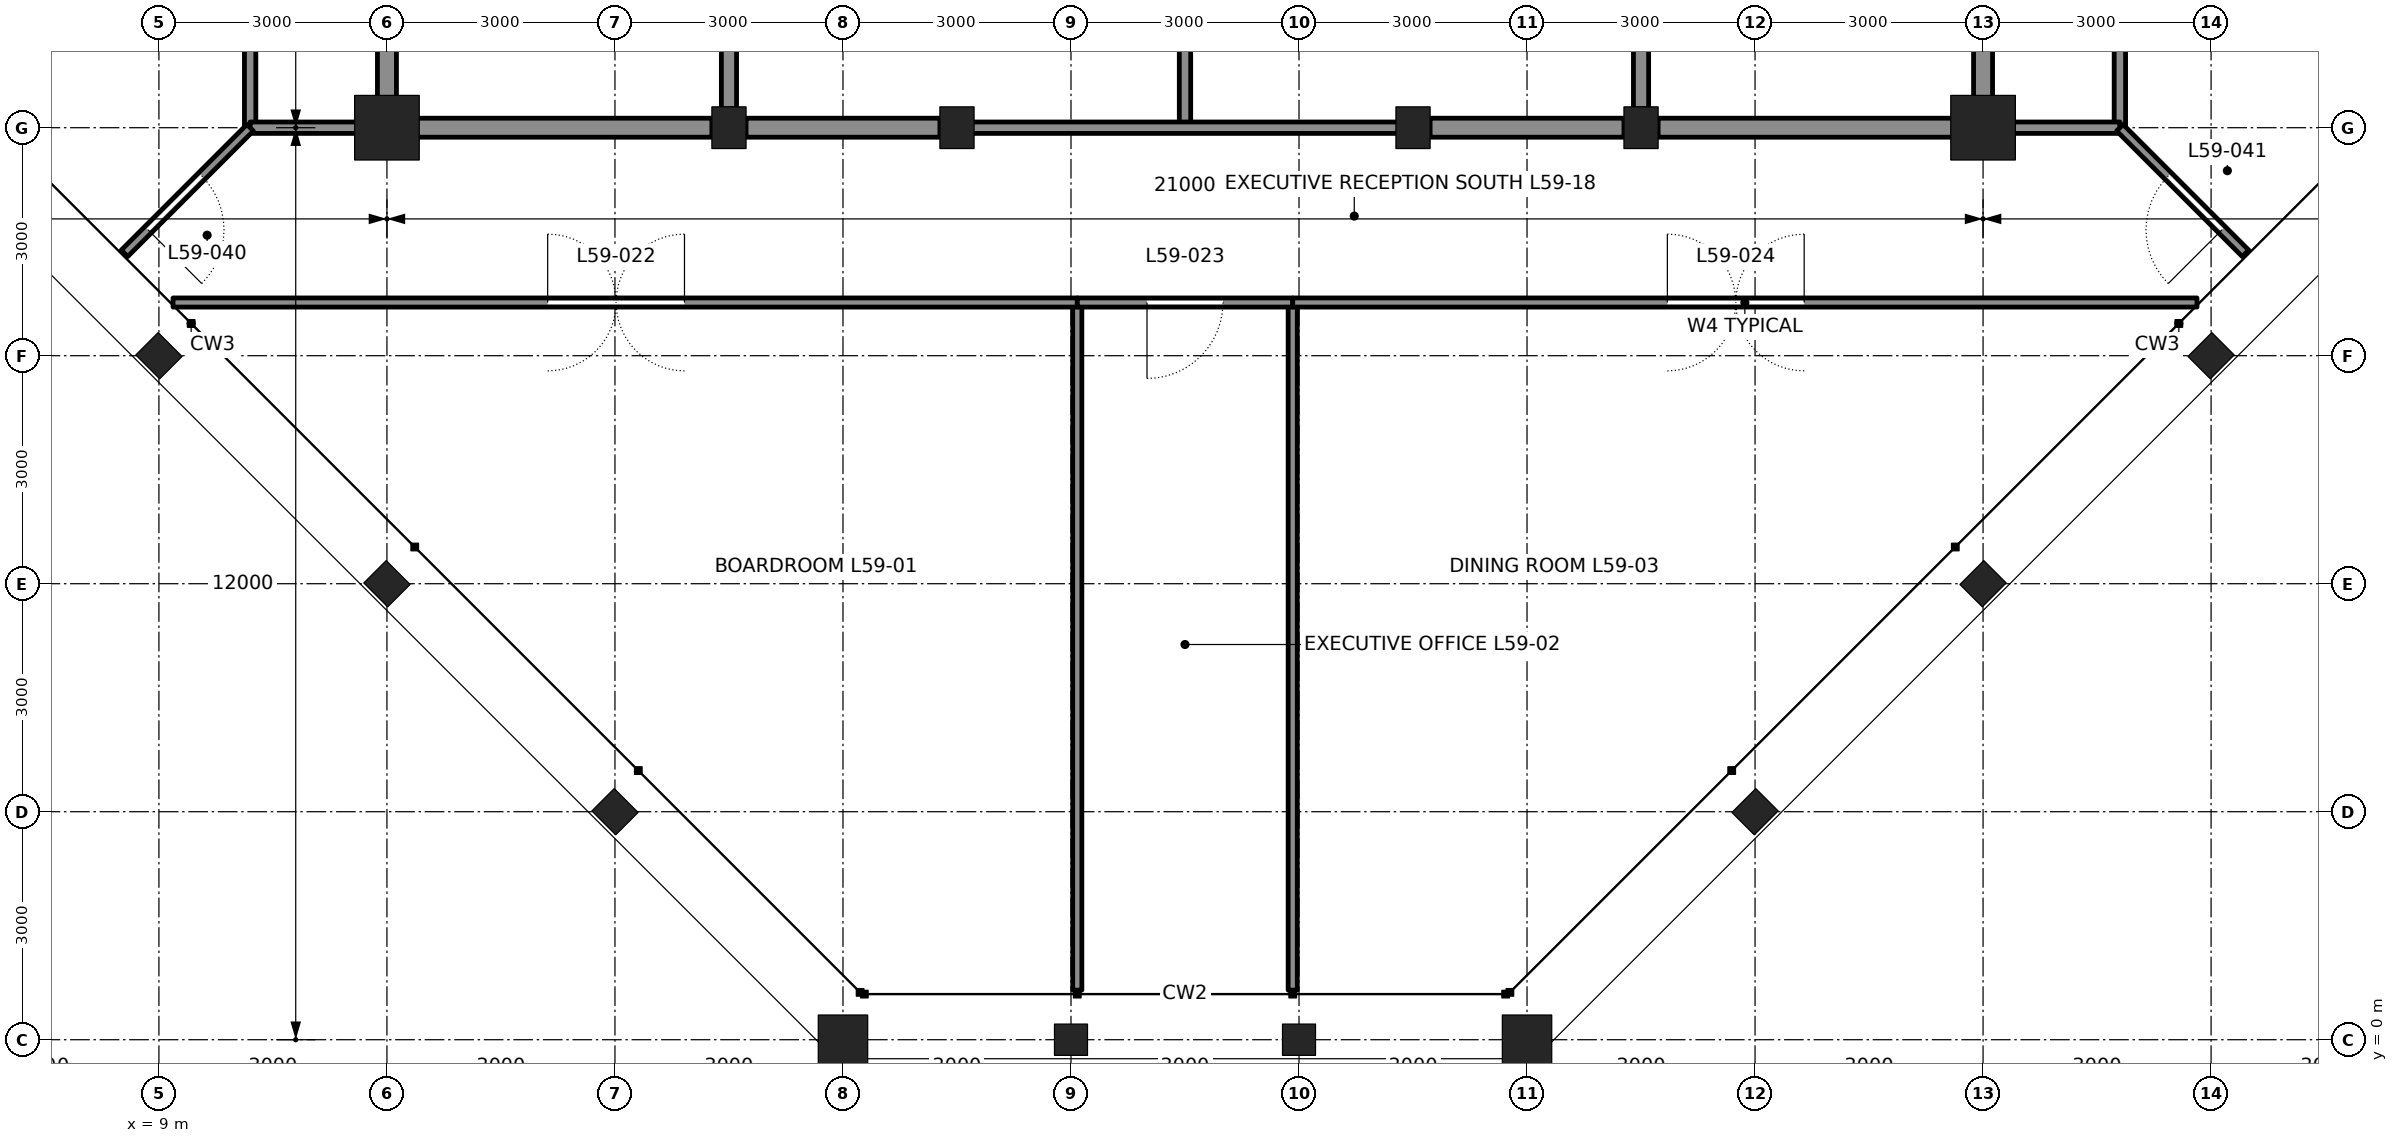
"""IFC4 building model, lengths in metres.
Left out: names, types, materials, properties, quantities, classifications, styles, units other than length and angle.
Written with IfcOpenShell. Run it as: python <this file> out.ifc"""

import sys

from ifc_helpers import new_model, si_unit, direction, frame, frame_2d, origin, origin_2d, place, context, subcontext, project, spatial, rectangle, hollow_rectangle, i_section, extrude, element, fill, save


model = new_model("IFC4")
c1 = context("Model", 3, precision=1e-05, world=origin(), true_north=direction((0.0, 1.0)))
c2 = subcontext(c1, "Body", "Model", "MODEL_VIEW")
j1 = project(units=[si_unit("LENGTHUNIT", "METRE"), si_unit("PLANEANGLEUNIT", "RADIAN")], contexts=[c1])
p1 = place(None, origin())
s1 = spatial("IfcSite", under=j1, at=p1, CompositionType="ELEMENT")
p2 = place(p1, origin())
s2 = spatial("IfcBuilding", under=s1, at=p2, CompositionType="ELEMENT")
p3 = place(p2, frame((0.0, 0.0, 266.4)))
s3 = spatial("IfcBuildingStorey", under=s2, at=p3, CompositionType="ELEMENT", Elevation=266.4)
p4 = place(p3, frame((18.0, 0.0, 0.0), z_axis=(0.0, 0.0, 1.0), x_axis=(0.0, -1.0, 0.0)))
e1 = element("IfcColumn", 1, at=p4, inside=s3, PredefinedType="COLUMN", context=c2, shape_type="SweptSolid", body=[
    extrude(hollow_rectangle(XDim=0.65, YDim=0.65, WallThickness=0.065, at=origin_2d()), origin(), (0.0, 0.0, 1.0), 4.2),
])
for number, where, z_axis, x_axis in (
    (2, (21.0, 0.0, 0.0), (0.0, 0.0, 1.0), (0.0, -1.0, 0.0)),
    (3, (24.0, 0.0, 0.0), (0.0, 0.0, 1.0), (0.0, -1.0, 0.0)),
):
    element("IfcColumn", number, at=place(p3, frame(where, z_axis=z_axis, x_axis=x_axis)), inside=s3, PredefinedType="COLUMN", context=c2, shape_type="SweptSolid", body=[
        extrude(i_section(OverallWidth=0.411, OverallDepth=0.434, WebThickness=0.036, FlangeThickness=0.057, at=origin_2d()), origin(), (0.0, 0.0, 1.0), 4.2),
    ])
p5 = place(p3, frame((27.0, 0.0, 0.0), z_axis=(0.0, 0.0, 1.0), x_axis=(0.0, -1.0, 0.0)))
e4 = element("IfcColumn", 4, at=p5, inside=s3, PredefinedType="COLUMN", context=c2, shape_type="SweptSolid", body=[
    extrude(hollow_rectangle(XDim=0.65, YDim=0.65, WallThickness=0.065, at=origin_2d()), origin(), (0.0, 0.0, 1.0), 4.2),
])
for number, where, z_axis, x_axis in (
    (5, (30.0, 3.0, 0.0), (0.0, 0.0, 1.0), (0.707, -0.707, 0.0)),
    (6, (33.0, 6.0, 0.0), (0.0, 0.0, 1.0), (0.707, -0.707, 0.0)),
    (7, (36.0, 9.0, 0.0), (0.0, 0.0, 1.0), (0.707, -0.707, 0.0)),
    (8, (9.0, 9.0, 0.0), (0.0, 0.0, 1.0), (-0.707, -0.707, 0.0)),
    (9, (12.0, 6.0, 0.0), (0.0, 0.0, 1.0), (-0.707, -0.707, 0.0)),
    (10, (15.0, 3.0, 0.0), (0.0, 0.0, 1.0), (-0.707, -0.707, 0.0)),
):
    element("IfcColumn", number, at=place(p3, frame(where, z_axis=z_axis, x_axis=x_axis)), inside=s3, PredefinedType="COLUMN", context=c2, shape_type="SweptSolid", body=[
        extrude(i_section(OverallWidth=0.417, OverallDepth=0.445, WebThickness=0.039, FlangeThickness=0.063, at=origin_2d()), origin(), (0.0, 0.0, 1.0), 4.2),
    ])
p6 = place(p3, frame((12.0, 12.0, 0.0), z_axis=(0.0, 0.0, 1.0), x_axis=(1.0, 0.0, 0.0)))
e11 = element("IfcColumn", 11, at=p6, inside=s3, PredefinedType="COLUMN", context=c2, shape_type="SweptSolid", body=[
    extrude(hollow_rectangle(XDim=0.85, YDim=0.85, WallThickness=0.085, at=origin_2d()), origin(), (0.0, 0.0, 1.0), 4.2),
])
for number, where, z_axis, x_axis in (
    (12, (16.5, 12.0, 0.0), (0.0, 0.0, 1.0), (1.0, 0.0, 0.0)),
    (13, (19.5, 12.0, 0.0), (0.0, 0.0, 1.0), (1.0, 0.0, 0.0)),
    (14, (25.5, 12.0, 0.0), (0.0, 0.0, 1.0), (1.0, 0.0, 0.0)),
    (15, (28.5, 12.0, 0.0), (0.0, 0.0, 1.0), (1.0, 0.0, 0.0)),
):
    element("IfcColumn", number, at=place(p3, frame(where, z_axis=z_axis, x_axis=x_axis)), inside=s3, PredefinedType="COLUMN", context=c2, shape_type="SweptSolid", body=[
        extrude(i_section(OverallWidth=0.449, OverallDepth=0.549, WebThickness=0.072, FlangeThickness=0.115, at=origin_2d()), origin(), (0.0, 0.0, 1.0), 4.2),
    ])
p7 = place(p3, frame((33.0, 12.0, 0.0), z_axis=(0.0, 0.0, 1.0), x_axis=(1.0, 0.0, 0.0)))
e16 = element("IfcColumn", 16, at=p7, inside=s3, PredefinedType="COLUMN", context=c2, shape_type="SweptSolid", body=[
    extrude(hollow_rectangle(XDim=0.85, YDim=0.85, WallThickness=0.085, at=origin_2d()), origin(), (0.0, 0.0, 1.0), 4.2),
])
p8 = place(p3, frame((12.0, 12.25, 0.0), z_axis=(0.0, 0.0, 1.0), x_axis=(0.0, 1.0, 0.0)))
e17 = element("IfcWall", 17, at=p8, inside=s3, PredefinedType="SOLIDWALL", context=c2, shape_type="SweptSolid", body=[
    extrude(rectangle(XDim=8.5, YDim=0.25, at=frame_2d((4.25, 0.0))), origin(), (0.0, 0.0, 1.0), 3.113),
])
p9 = place(p8, frame((0.875, 0.0, 0.0)))
e18 = element("IfcOpeningElement", 18, at=p9, cuts=e17, PredefinedType="OPENING", context=c2, shape_type="SweptSolid", body=[
    extrude(rectangle(XDim=0.75, YDim=2.1, at=frame_2d((0.375, 1.05))), frame((0.0, 0.135, 0.0), z_axis=(0.0, -1.0, 0.0), x_axis=(1.0, 0.0, 0.0)), (0.0, 0.0, 1.0), 0.27),
])
p10 = place(p3, frame((12.25, 12.0, 0.0), z_axis=(0.0, 0.0, 1.0), x_axis=(1.0, 0.0, 0.0)))
e19 = element("IfcWall", 19, at=p10, inside=s3, PredefinedType="SOLIDWALL", context=c2, shape_type="SweptSolid", body=[
    extrude(rectangle(XDim=4.025, YDim=0.25, at=frame_2d((2.013, 0.0))), origin(), (0.0, 0.0, 1.0), 3.182),
])
for number, where, z_axis, x_axis in (
    (20, (16.725, 12.0, 0.0), (0.0, 0.0, 1.0), (1.0, 0.0, 0.0)),
    (21, (25.725, 12.0, 0.0), (0.0, 0.0, 1.0), (1.0, 0.0, 0.0)),
):
    element("IfcWall", number, at=place(p3, frame(where, z_axis=z_axis, x_axis=x_axis)), inside=s3, PredefinedType="SOLIDWALL", context=c2, shape_type="SweptSolid", body=[
        extrude(rectangle(XDim=2.55, YDim=0.25, at=frame_2d((1.275, 0.0))), origin(), (0.0, 0.0, 1.0), 3.182),
    ])
p11 = place(p3, frame((28.725, 12.0, 0.0), z_axis=(0.0, 0.0, 1.0), x_axis=(1.0, 0.0, 0.0)))
e22 = element("IfcWall", 22, at=p11, inside=s3, PredefinedType="SOLIDWALL", context=c2, shape_type="SweptSolid", body=[
    extrude(rectangle(XDim=4.025, YDim=0.25, at=frame_2d((2.013, 0.0))), origin(), (0.0, 0.0, 1.0), 3.182),
])
for number, where, z_axis, x_axis in (
    (23, (16.5, 12.25, 0.0), (0.0, 0.0, 1.0), (0.0, 1.0, 0.0)),
    (24, (28.5, 12.25, 0.0), (0.0, 0.0, 1.0), (0.0, 1.0, 0.0)),
):
    element("IfcWall", number, at=place(p3, frame(where, z_axis=z_axis, x_axis=x_axis)), inside=s3, PredefinedType="SOLIDWALL", context=c2, shape_type="SweptSolid", body=[
        extrude(rectangle(XDim=8.5, YDim=0.2, at=frame_2d((4.25, 0.0))), origin(), (0.0, 0.0, 1.0), 3.113),
    ])
p12 = place(p3, frame((33.0, 12.25, 0.0), z_axis=(0.0, 0.0, 1.0), x_axis=(0.0, 1.0, 0.0)))
e25 = element("IfcWall", 25, at=p12, inside=s3, PredefinedType="SOLIDWALL", context=c2, shape_type="SweptSolid", body=[
    extrude(rectangle(XDim=8.5, YDim=0.25, at=frame_2d((4.25, 0.0))), origin(), (0.0, 0.0, 1.0), 3.113),
])
p13 = place(p12, frame((6.65, 0.0, 0.0)))
e26 = element("IfcOpeningElement", 26, at=p13, cuts=e25, PredefinedType="OPENING", context=c2, shape_type="SweptSolid", body=[
    extrude(rectangle(XDim=1.2, YDim=2.1, at=frame_2d((0.6, 1.05))), frame((0.0, 0.135, 0.0), z_axis=(0.0, -1.0, 0.0), x_axis=(1.0, 0.0, 0.0)), (0.0, 0.0, 1.0), 0.27),
])
p14 = place(p12, frame((0.875, 0.0, 0.0)))
e27 = element("IfcOpeningElement", 27, at=p14, cuts=e25, PredefinedType="OPENING", context=c2, shape_type="SweptSolid", body=[
    extrude(rectangle(XDim=0.75, YDim=2.1, at=frame_2d((0.375, 1.05))), frame((0.0, 0.135, 0.0), z_axis=(0.0, -1.0, 0.0), x_axis=(1.0, 0.0, 0.0)), (0.0, 0.0, 1.0), 0.27),
])
p15 = place(p3, frame((22.5, 15.0, 0.0), z_axis=(0.0, 0.0, 1.0), x_axis=(0.0, -1.0, 0.0)))
e28 = element("IfcWall", 28, at=p15, inside=s3, PredefinedType="PARTITIONING", context=c2, shape_type="SweptSolid", body=[
    extrude(rectangle(XDim=3.0, YDim=0.15, at=frame_2d((1.5, 0.0))), origin(), (0.0, 0.0, 1.0), 4.04),
])
p16 = place(p3, frame((19.5, 12.0, 0.0), z_axis=(0.0, 0.0, 1.0), x_axis=(1.0, 0.0, 0.0)))
e29 = element("IfcWall", 29, at=p16, inside=s3, PredefinedType="PARTITIONING", context=c2, shape_type="SweptSolid", body=[
    extrude(rectangle(XDim=6.0, YDim=0.15, at=frame_2d((3.0, 0.0))), origin(), (0.0, 0.0, 1.0), 3.182),
])
for number, where, z_axis, x_axis in (
    (30, (21.083, 0.653, 0.0), (0.0, 0.0, 1.0), (0.0, 1.0, 0.0)),
    (31, (23.917, 0.653, 0.0), (0.0, 0.0, 1.0), (0.0, 1.0, 0.0)),
):
    element("IfcWall", number, at=place(p3, frame(where, z_axis=z_axis, x_axis=x_axis)), inside=s3, PredefinedType="PARTITIONING", context=c2, shape_type="SweptSolid", body=[
        extrude(rectangle(XDim=9.047, YDim=0.12, at=frame_2d((4.524, 0.0))), origin(), (0.0, 0.0, 1.0), 3.357),
    ])
p17 = place(p3, frame((9.186, 9.7, 0.0), z_axis=(0.0, 0.0, 1.0), x_axis=(1.0, 0.0, 0.0)))
e32 = element("IfcWall", 32, at=p17, inside=s3, PredefinedType="PARTITIONING", context=c2, shape_type="SweptSolid", body=[
    extrude(rectangle(XDim=11.897, YDim=0.12, at=frame_2d((5.949, 0.0))), origin(), (0.0, 0.0, 1.0), 4.04),
])
p18 = place(p17, frame((4.929, 0.0, 0.0)))
e33 = element("IfcOpeningElement", 33, at=p18, cuts=e32, PredefinedType="OPENING", context=c2, shape_type="SweptSolid", body=[
    extrude(rectangle(XDim=1.8, YDim=2.4, at=frame_2d((0.9, 1.2))), frame((0.0, 0.07, 0.0), z_axis=(0.0, -1.0, 0.0), x_axis=(1.0, 0.0, 0.0)), (0.0, 0.0, 1.0), 0.14),
])
p19 = place(p3, frame((21.083, 9.7, 0.0), z_axis=(0.0, 0.0, 1.0), x_axis=(1.0, 0.0, 0.0)))
e34 = element("IfcWall", 34, at=p19, inside=s3, PredefinedType="PARTITIONING", context=c2, shape_type="SweptSolid", body=[
    extrude(rectangle(XDim=2.834, YDim=0.12, at=frame_2d((1.417, 0.0))), origin(), (0.0, 0.0, 1.0), 4.04),
])
p20 = place(p19, frame((0.917, 0.0, 0.0)))
e35 = element("IfcOpeningElement", 35, at=p20, cuts=e34, PredefinedType="OPENING", context=c2, shape_type="SweptSolid", body=[
    extrude(rectangle(XDim=1.0, YDim=2.4, at=frame_2d((0.5, 1.2))), frame((0.0, 0.07, 0.0), z_axis=(0.0, -1.0, 0.0), x_axis=(1.0, 0.0, 0.0)), (0.0, 0.0, 1.0), 0.14),
])
p21 = place(p3, frame((23.917, 9.7, 0.0), z_axis=(0.0, 0.0, 1.0), x_axis=(1.0, 0.0, 0.0)))
e36 = element("IfcWall", 36, at=p21, inside=s3, PredefinedType="PARTITIONING", context=c2, shape_type="SweptSolid", body=[
    extrude(rectangle(XDim=11.897, YDim=0.12, at=frame_2d((5.949, 0.0))), origin(), (0.0, 0.0, 1.0), 4.04),
])
p22 = place(p21, frame((4.929, 0.0, 0.0)))
e37 = element("IfcOpeningElement", 37, at=p22, cuts=e36, PredefinedType="OPENING", context=c2, shape_type="SweptSolid", body=[
    extrude(rectangle(XDim=1.8, YDim=2.4, at=frame_2d((0.9, 1.2))), frame((0.0, 0.07, 0.0), z_axis=(0.0, -1.0, 0.0), x_axis=(1.0, 0.0, 0.0)), (0.0, 0.0, 1.0), 0.14),
])
p23 = place(p3, frame((10.2, 12.0, 0.0), z_axis=(0.0, 0.0, 1.0), x_axis=(0.0, 1.0, 0.0)))
e38 = element("IfcWall", 38, at=p23, inside=s3, PredefinedType="PARTITIONING", context=c2, shape_type="SweptSolid", body=[
    extrude(rectangle(XDim=24.314, YDim=0.15, at=frame_2d((12.157, 0.0))), origin(), (0.0, 0.0, 1.0), 4.04),
])
p24 = place(p23, frame((11.5, 0.0, 0.0)))
e39 = element("IfcOpeningElement", 39, at=p24, cuts=e38, PredefinedType="OPENING", context=c2, shape_type="SweptSolid", body=[
    extrude(rectangle(XDim=1.0, YDim=2.4, at=frame_2d((0.5, 1.2))), frame((0.0, 0.085, 0.0), z_axis=(0.0, -1.0, 0.0), x_axis=(1.0, 0.0, 0.0)), (0.0, 0.0, 1.0), 0.17),
])
p25 = place(p3, frame((10.2, 12.0, 0.0), z_axis=(0.0, 0.0, 1.0), x_axis=(1.0, 0.0, 0.0)))
e40 = element("IfcWall", 40, at=p25, inside=s3, PredefinedType="PARTITIONING", context=c2, shape_type="SweptSolid", body=[
    extrude(rectangle(XDim=1.8, YDim=0.15, at=frame_2d((0.9, 0.0))), origin(), (0.0, 0.0, 1.0), 3.271),
])
p26 = place(p3, frame((34.8, 12.0, 0.0), z_axis=(0.0, 0.0, 1.0), x_axis=(0.0, 1.0, 0.0)))
e41 = element("IfcWall", 41, at=p26, inside=s3, PredefinedType="PARTITIONING", context=c2, shape_type="SweptSolid", body=[
    extrude(rectangle(XDim=24.314, YDim=0.15, at=frame_2d((12.157, 0.0))), origin(), (0.0, 0.0, 1.0), 4.04),
])
p27 = place(p26, frame((11.5, 0.0, 0.0)))
e42 = element("IfcOpeningElement", 42, at=p27, cuts=e41, PredefinedType="OPENING", context=c2, shape_type="SweptSolid", body=[
    extrude(rectangle(XDim=1.0, YDim=2.4, at=frame_2d((0.5, 1.2))), frame((0.0, 0.085, 0.0), z_axis=(0.0, -1.0, 0.0), x_axis=(1.0, 0.0, 0.0)), (0.0, 0.0, 1.0), 0.17),
])
p28 = place(p3, frame((33.0, 12.0, 0.0), z_axis=(0.0, 0.0, 1.0), x_axis=(1.0, 0.0, 0.0)))
e43 = element("IfcWall", 43, at=p28, inside=s3, PredefinedType="PARTITIONING", context=c2, shape_type="SweptSolid", body=[
    extrude(rectangle(XDim=1.8, YDim=0.15, at=frame_2d((0.9, 0.0))), origin(), (0.0, 0.0, 1.0), 3.271),
])
p29 = place(p3, frame((10.2, 12.0, 0.0), z_axis=(0.0, 0.0, 1.0), x_axis=(-0.707106781187, -0.707106781187, 0.0)))
e44 = element("IfcWall", 44, at=p29, inside=s3, PredefinedType="PARTITIONING", context=c2, shape_type="SweptSolid", body=[
    extrude(rectangle(XDim=2.338, YDim=0.12, at=frame_2d((1.169, 0.0))), origin(), (0.0, 0.0, 1.0), 4.04),
])
p30 = place(p29, frame((0.9, 0.0, 0.0)))
e45 = element("IfcOpeningElement", 45, at=p30, cuts=e44, PredefinedType="OPENING", context=c2, shape_type="SweptSolid", body=[
    extrude(rectangle(XDim=1.0, YDim=2.4, at=frame_2d((0.5, 1.2))), frame((0.0, 0.07, 0.0), z_axis=(0.0, -1.0, 0.0), x_axis=(1.0, 0.0, 0.0)), (0.0, 0.0, 1.0), 0.14),
])
p31 = place(p3, frame((34.8, 12.0, 0.0), z_axis=(0.0, 0.0, 1.0), x_axis=(0.707106781187, -0.707106781187, 0.0)))
e46 = element("IfcWall", 46, at=p31, inside=s3, PredefinedType="PARTITIONING", context=c2, shape_type="SweptSolid", body=[
    extrude(rectangle(XDim=2.338, YDim=0.12, at=frame_2d((1.169, 0.0))), origin(), (0.0, 0.0, 1.0), 4.04),
])
p32 = place(p31, frame((0.9, 0.0, 0.0)))
e47 = element("IfcOpeningElement", 47, at=p32, cuts=e46, PredefinedType="OPENING", context=c2, shape_type="SweptSolid", body=[
    extrude(rectangle(XDim=1.0, YDim=2.4, at=frame_2d((0.5, 1.2))), frame((0.0, 0.07, 0.0), z_axis=(0.0, -1.0, 0.0), x_axis=(1.0, 0.0, 0.0)), (0.0, 0.0, 1.0), 0.14),
])
p33 = place(p18, origin())
e48 = element("IfcDoor", 48, at=p33, inside=s3, OperationType="DOUBLE_DOOR_DOUBLE_SWING", PredefinedType="DOOR", context=c2, shape_type="SweptSolid", body=[
    extrude(rectangle(XDim=1.8, YDim=2.4, at=frame_2d((0.9, 1.2))), frame((0.0, 0.025, 0.0), z_axis=(0.0, -1.0, 0.0), x_axis=(1.0, 0.0, 0.0)), (0.0, 0.0, 1.0), 0.05),
])
fill(e33, e48)
p34 = place(p20, frame((1.0, 0.0, 0.0), z_axis=(0.0, 0.0, 1.0), x_axis=(-1.0, 0.0, 0.0)))
e49 = element("IfcDoor", 49, at=p34, inside=s3, OperationType="SINGLE_SWING_RIGHT", PredefinedType="DOOR", context=c2, shape_type="SweptSolid", body=[
    extrude(rectangle(XDim=1.0, YDim=2.4, at=frame_2d((0.5, 1.2))), frame((0.0, 0.025, 0.0), z_axis=(0.0, -1.0, 0.0), x_axis=(1.0, 0.0, 0.0)), (0.0, 0.0, 1.0), 0.05),
])
fill(e35, e49)
p35 = place(p22, origin())
e50 = element("IfcDoor", 50, at=p35, inside=s3, OperationType="DOUBLE_DOOR_DOUBLE_SWING", PredefinedType="DOOR", context=c2, shape_type="SweptSolid", body=[
    extrude(rectangle(XDim=1.8, YDim=2.4, at=frame_2d((0.9, 1.2))), frame((0.0, 0.025, 0.0), z_axis=(0.0, -1.0, 0.0), x_axis=(1.0, 0.0, 0.0)), (0.0, 0.0, 1.0), 0.05),
])
fill(e37, e50)
p36 = place(p30, origin())
e51 = element("IfcDoor", 51, at=p36, inside=s3, OperationType="SINGLE_SWING_RIGHT", PredefinedType="DOOR", context=c2, shape_type="SweptSolid", body=[
    extrude(rectangle(XDim=1.0, YDim=2.4, at=frame_2d((0.5, 1.2))), frame((0.0, 0.025, 0.0), z_axis=(0.0, -1.0, 0.0), x_axis=(1.0, 0.0, 0.0)), (0.0, 0.0, 1.0), 0.05),
])
fill(e45, e51)
p37 = place(p32, frame((1.0, 0.0, 0.0), z_axis=(0.0, 0.0, 1.0), x_axis=(-1.0, 0.0, 0.0)))
e52 = element("IfcDoor", 52, at=p37, inside=s3, OperationType="SINGLE_SWING_LEFT", PredefinedType="DOOR", context=c2, shape_type="SweptSolid", body=[
    extrude(rectangle(XDim=1.0, YDim=2.4, at=frame_2d((0.5, 1.2))), frame((0.0, 0.025, 0.0), z_axis=(0.0, -1.0, 0.0), x_axis=(1.0, 0.0, 0.0)), (0.0, 0.0, 1.0), 0.05),
])
fill(e47, e52)
save(model, sys.argv[1])
